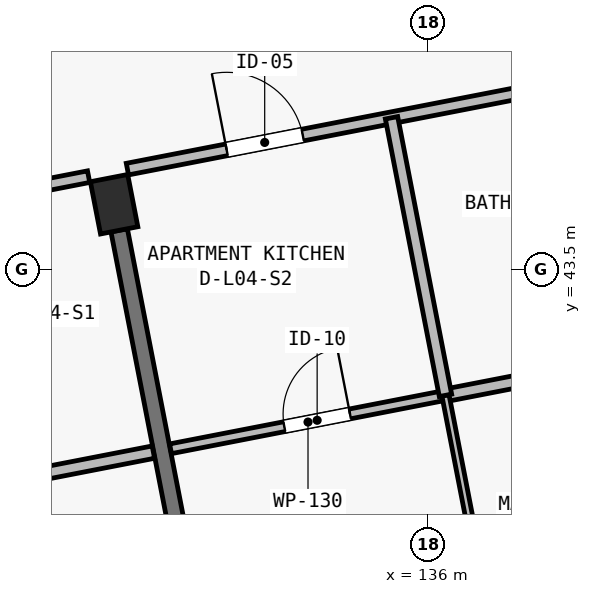
"""IFC4 building model, lengths in metres.
Left out: names, types, materials, properties, quantities, classifications, styles, units other than length and angle.
Written with IfcOpenShell. Run it as: python <this file> out.ifc"""

import sys

from ifc_helpers import new_model, si_unit, direction, frame, frame_2d, origin, origin_2d, place, context, subcontext, project, spatial, rectangle, extrude, element, fill, save


model = new_model("IFC4")
c1 = context("Model", 3, precision=1e-05, world=origin(), true_north=direction((0.0, 1.0)))
c2 = subcontext(c1, "Body", "Model", "MODEL_VIEW")
j1 = project(units=[si_unit("LENGTHUNIT", "METRE"), si_unit("PLANEANGLEUNIT", "RADIAN")], contexts=[c1])
p1 = place(None, origin())
s1 = spatial("IfcSite", under=j1, at=p1, CompositionType="ELEMENT")
p2 = place(p1, origin())
s2 = spatial("IfcBuilding", under=s1, at=p2, CompositionType="ELEMENT")
p3 = place(p2, frame((0.0, 0.0, 14.9)))
s3 = spatial("IfcBuildingStorey", under=s2, at=p3, CompositionType="ELEMENT", Elevation=14.9)
p4 = place(p3, frame((131.871, 44.361, 0.0), z_axis=(0.0, 0.0, 1.0), x_axis=(0.981627183448, 0.190808995377, 0.0)))
e1 = element("IfcColumn", 1, at=p4, inside=s3, PredefinedType="COLUMN", context=c2, shape_type="SweptSolid", body=[
    extrude(rectangle(XDim=0.5, YDim=0.7, at=origin_2d()), origin(), (0.0, 0.0, 1.0), 3.25),
])
p5 = place(p3, frame((133.254, 37.244, 0.0), z_axis=(0.0, 0.0, 1.0), x_axis=(-0.190819465253, 0.981625148252, 0.0)))
e2 = element("IfcWall", 2, at=p5, inside=s3, PredefinedType="SHEAR", context=c2, shape_type="SweptSolid", body=[
    extrude(rectangle(XDim=6.9, YDim=0.22, at=frame_2d((3.45, 0.0))), origin(), (0.0, 0.0, 1.0), 2.5),
])
p6 = place(p3, frame((124.585, 43.372, 0.0), z_axis=(0.0, 0.0, 1.0), x_axis=(0.9816234647, 0.190828125677, 0.0)))
e3 = element("IfcWall", 3, at=p6, inside=s3, PredefinedType="PARTITIONING", context=c2, shape_type="SweptSolid", body=[
    extrude(rectangle(XDim=7.08, YDim=0.155, at=frame_2d((3.54, 0.0))), origin(), (0.0, 0.0, 1.0), 2.97),
])
p7 = place(p6, frame((1.33, 0.0, 0.0)))
e4 = element("IfcOpeningElement", 4, at=p7, cuts=e3, PredefinedType="OPENING", context=c2, shape_type="SweptSolid", body=[
    extrude(rectangle(XDim=0.98, YDim=2.15, at=frame_2d((0.49, 1.075))), frame((0.0, 0.093, 0.0), z_axis=(0.0, -1.0, 0.0), x_axis=(1.0, 0.0, 0.0)), (0.0, 0.0, 1.0), 0.185),
])
p8 = place(p3, frame((128.77, 40.396, 0.0), z_axis=(0.0, 0.0, 1.0), x_axis=(0.981628834294, 0.190800502313, 0.0)))
e5 = element("IfcWall", 5, at=p8, inside=s3, PredefinedType="PLUMBINGWALL", context=c2, shape_type="SweptSolid", body=[
    extrude(rectangle(XDim=3.685, YDim=0.165, at=frame_2d((1.843, 0.0))), origin(), (0.0, 0.0, 1.0), 2.97),
])
p9 = place(p8, frame((1.3, 0.0, 0.0)))
e6 = element("IfcOpeningElement", 6, at=p9, cuts=e5, PredefinedType="OPENING", context=c2, shape_type="SweptSolid", body=[
    extrude(rectangle(XDim=0.82, YDim=2.08, at=frame_2d((0.41, 1.04))), frame((0.0, 0.097, 0.0), z_axis=(0.0, -1.0, 0.0), x_axis=(1.0, 0.0, 0.0)), (0.0, 0.0, 1.0), 0.195),
])
p10 = place(p3, frame((132.046, 44.823, 0.0), z_axis=(0.0, 0.0, 1.0), x_axis=(0.9816234647, 0.190828125677, 0.0)))
e7 = element("IfcWall", 7, at=p10, inside=s3, PredefinedType="PARTITIONING", context=c2, shape_type="SweptSolid", body=[
    extrude(rectangle(XDim=7.08, YDim=0.155, at=frame_2d((3.54, 0.0))), origin(), (0.0, 0.0, 1.0), 2.97),
])
p11 = place(p10, frame((1.33, 0.0, 0.0)))
e8 = element("IfcOpeningElement", 8, at=p11, cuts=e7, PredefinedType="OPENING", context=c2, shape_type="SweptSolid", body=[
    extrude(rectangle(XDim=1.02, YDim=2.2, at=frame_2d((0.51, 1.1))), frame((0.0, 0.093, 0.0), z_axis=(0.0, -1.0, 0.0), x_axis=(1.0, 0.0, 0.0)), (0.0, 0.0, 1.0), 0.185),
])
p12 = place(p3, frame((132.613, 41.143, 0.0), z_axis=(0.0, 0.0, 1.0), x_axis=(0.981628834294, 0.190800502313, 0.0)))
e9 = element("IfcWall", 9, at=p12, inside=s3, PredefinedType="PARTITIONING", context=c2, shape_type="SweptSolid", body=[
    extrude(rectangle(XDim=3.685, YDim=0.13, at=frame_2d((1.843, 0.0))), origin(), (0.0, 0.0, 1.0), 2.97),
])
p13 = place(p12, frame((1.525, 0.0, 0.0)))
e10 = element("IfcOpeningElement", 10, at=p13, cuts=e9, PredefinedType="OPENING", context=c2, shape_type="SweptSolid", body=[
    extrude(rectangle(XDim=0.88, YDim=2.1, at=frame_2d((0.44, 1.05))), frame((0.0, 0.08, 0.0), z_axis=(0.0, -1.0, 0.0), x_axis=(1.0, 0.0, 0.0)), (0.0, 0.0, 1.0), 0.16),
])
p14 = place(p3, frame((136.23, 41.846, 0.0), z_axis=(0.0, 0.0, 1.0), x_axis=(0.981626422232, 0.190812911449, 0.0)))
e11 = element("IfcWall", 11, at=p14, inside=s3, PredefinedType="PLUMBINGWALL", context=c2, shape_type="SweptSolid", body=[
    extrude(rectangle(XDim=3.685, YDim=0.165, at=frame_2d((1.842, 0.0))), origin(), (0.0, 0.0, 1.0), 2.97),
])
p15 = place(p14, frame((1.3, 0.0, 0.0)))
e12 = element("IfcOpeningElement", 12, at=p15, cuts=e11, PredefinedType="OPENING", context=c2, shape_type="SweptSolid", body=[
    extrude(rectangle(XDim=0.82, YDim=2.08, at=frame_2d((0.41, 1.04))), frame((0.0, 0.097, 0.0), z_axis=(0.0, -1.0, 0.0), x_axis=(1.0, 0.0, 0.0)), (0.0, 0.0, 1.0), 0.195),
])
p16 = place(p3, frame((137.125, 37.242, 0.0), z_axis=(0.0, 0.0, 1.0), x_axis=(-0.190777702748, 0.981633265601, 0.0)))
e13 = element("IfcWall", 13, at=p16, inside=s3, PredefinedType="PARTITIONING", context=c2, shape_type="SweptSolid", body=[
    extrude(rectangle(XDim=4.69, YDim=0.095, at=frame_2d((2.345, 0.0))), origin(), (0.0, 0.0, 1.0), 2.97),
])
p17 = place(p16, frame((1.35, 0.0, 0.0)))
e14 = element("IfcOpeningElement", 14, at=p17, cuts=e13, PredefinedType="OPENING", context=c2, shape_type="SweptSolid", body=[
    extrude(rectangle(XDim=0.9, YDim=2.1, at=frame_2d((0.45, 1.05))), frame((0.0, 0.062, 0.0), z_axis=(0.0, -1.0, 0.0), x_axis=(1.0, 0.0, 0.0)), (0.0, 0.0, 1.0), 0.125),
])
p18 = place(p3, frame((136.23, 41.846, 0.0), z_axis=(0.0, 0.0, 1.0), x_axis=(-0.190850336204, 0.981619146701, 0.0)))
e15 = element("IfcWall", 15, at=p18, inside=s3, PredefinedType="PLUMBINGWALL", context=c2, shape_type="SweptSolid", body=[
    extrude(rectangle(XDim=3.72, YDim=0.165, at=frame_2d((1.86, 0.0))), origin(), (0.0, 0.0, 1.0), 2.97),
])
p19 = place(p11, origin())
e16 = element("IfcDoor", 16, at=p19, inside=s3, OperationType="SINGLE_SWING_LEFT", PredefinedType="DOOR", context=c2, shape_type="SweptSolid", body=[
    extrude(rectangle(XDim=1.02, YDim=2.2, at=frame_2d((0.51, 1.1))), frame((0.0, 0.025, 0.0), z_axis=(0.0, -1.0, 0.0), x_axis=(1.0, 0.0, 0.0)), (0.0, 0.0, 1.0), 0.05),
])
fill(e8, e16)
p20 = place(p13, origin())
e17 = element("IfcDoor", 17, at=p20, inside=s3, OperationType="SINGLE_SWING_RIGHT", PredefinedType="DOOR", context=c2, shape_type="SweptSolid", body=[
    extrude(rectangle(XDim=0.88, YDim=2.1, at=frame_2d((0.44, 1.05))), frame((0.0, 0.025, 0.0), z_axis=(0.0, -1.0, 0.0), x_axis=(1.0, 0.0, 0.0)), (0.0, 0.0, 1.0), 0.05),
])
fill(e10, e17)
save(model, sys.argv[1])
